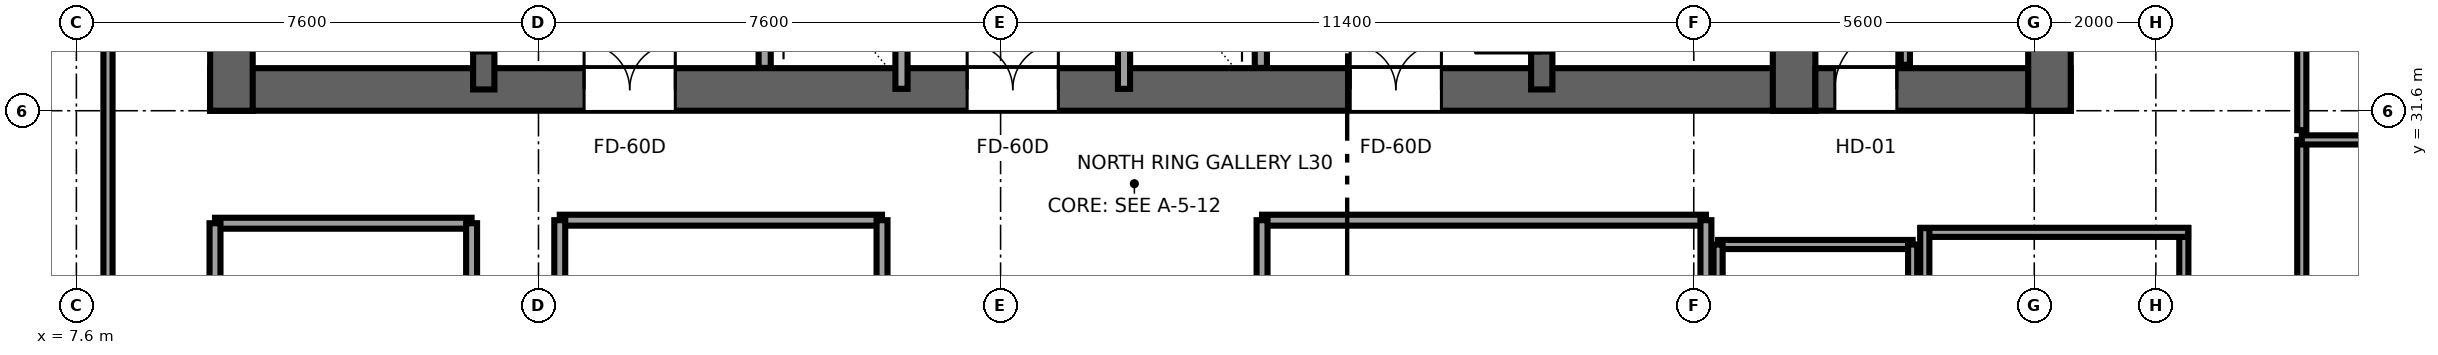
"""IFC4 building model, lengths in metres.
Left out: names, types, materials, properties, quantities, classifications, styles, units other than length and angle.
Written with IfcOpenShell. Run it as: python <this file> out.ifc"""

import sys

from ifc_helpers import new_model, si_unit, direction, frame, frame_2d, origin, place, context, subcontext, project, spatial, rectangle, extrude, source, transform, mapped, element, fill, save


model = new_model("IFC4")
c1 = context("Model", 3, precision=1e-05, world=origin(), true_north=direction((0.0, 1.0)))
c2 = subcontext(c1, "Body", "Model", "MODEL_VIEW")
j1 = project(units=[si_unit("LENGTHUNIT", "METRE"), si_unit("PLANEANGLEUNIT", "RADIAN")], contexts=[c1])
p1 = place(None, origin())
s1 = spatial("IfcSite", under=j1, at=p1, CompositionType="ELEMENT")
p2 = place(p1, origin())
s2 = spatial("IfcBuilding", under=s1, at=p2, CompositionType="ELEMENT")
p3 = place(p2, frame((0.0, 0.0, 118.65)))
s3 = spatial("IfcBuildingStorey", under=s2, at=p3, CompositionType="ELEMENT", Elevation=118.65)
p4 = place(p3, frame((9.8, 31.95, 0.0), z_axis=(0.0, 0.0, 1.0), x_axis=(1.0, 0.0, 0.0)))
e1 = element("IfcWall", 1, at=p4, inside=s3, PredefinedType="SHEAR", context=c2, shape_type="SweptSolid", body=[
    extrude(rectangle(XDim=26.4, YDim=0.7, at=frame_2d((13.2, 0.0))), origin(), (0.0, 0.0, 1.0), 3.55),
])
p5 = place(p4, frame((7.65, 0.0, 0.0), z_axis=(0.0, 0.0, 1.0), x_axis=(-1.0, 0.0, 0.0)))
e2 = element("IfcOpeningElement", 2, at=p5, cuts=e1, PredefinedType="OPENING", context=c2, shape_type="SweptSolid", body=[
    extrude(rectangle(XDim=1.5, YDim=2.04, at=frame_2d((0.75, 1.02))), frame((0.0, 0.36, 0.0), z_axis=(0.0, -1.0, 0.0), x_axis=(1.0, 0.0, 0.0)), (0.0, 0.0, 1.0), 0.72),
])
p6 = place(p4, frame((13.95, 0.0, 0.0), z_axis=(0.0, 0.0, 1.0), x_axis=(-1.0, 0.0, 0.0)))
e3 = element("IfcOpeningElement", 3, at=p6, cuts=e1, PredefinedType="OPENING", context=c2, shape_type="SweptSolid", body=[
    extrude(rectangle(XDim=1.5, YDim=2.04, at=frame_2d((0.75, 1.02))), frame((0.0, 0.36, 0.0), z_axis=(0.0, -1.0, 0.0), x_axis=(1.0, 0.0, 0.0)), (0.0, 0.0, 1.0), 0.72),
])
p7 = place(p4, frame((20.25, 0.0, 0.0), z_axis=(0.0, 0.0, 1.0), x_axis=(-1.0, 0.0, 0.0)))
e4 = element("IfcOpeningElement", 4, at=p7, cuts=e1, PredefinedType="OPENING", context=c2, shape_type="SweptSolid", body=[
    extrude(rectangle(XDim=1.5, YDim=2.04, at=frame_2d((0.75, 1.02))), frame((0.0, 0.36, 0.0), z_axis=(0.0, -1.0, 0.0), x_axis=(1.0, 0.0, 0.0)), (0.0, 0.0, 1.0), 0.72),
])
for number, where, z_axis, x_axis in (
    (5, (10.15, 31.6, 0.0), (0.0, 0.0, 1.0), (0.0, 1.0, 0.0)),
    (6, (35.85, 31.6, 0.0), (0.0, 0.0, 1.0), (0.0, 1.0, 0.0)),
):
    element("IfcWall", number, at=place(p3, frame(where, z_axis=z_axis, x_axis=x_axis)), inside=s3, PredefinedType="SHEAR", context=c2, shape_type="SweptSolid", body=[
        extrude(rectangle(XDim=13.6, YDim=0.7, at=frame_2d((6.8, 0.0))), origin(), (0.0, 0.0, 1.0), 3.55),
    ])
p8 = place(p3, frame((14.3, 31.95, 0.0), z_axis=(0.0, 0.0, 1.0), x_axis=(0.0, 1.0, 0.0)))
e7 = element("IfcWall", 7, at=p8, inside=s3, PredefinedType="SHEAR", context=c2, shape_type="SweptSolid", body=[
    extrude(rectangle(XDim=12.9, YDim=0.35, at=frame_2d((6.45, 0.0))), origin(), (0.0, 0.0, 1.0), 3.55),
])
p9 = place(p8, frame((0.6, 0.0, 0.0)))
e8 = element("IfcOpeningElement", 8, at=p9, cuts=e7, PredefinedType="OPENING", context=c2, shape_type="SweptSolid", body=[
    extrude(rectangle(XDim=1.1, YDim=2.12, at=frame_2d((0.55, 1.06))), frame((0.0, 0.185, 0.0), z_axis=(0.0, -1.0, 0.0), x_axis=(1.0, 0.0, 0.0)), (0.0, 0.0, 1.0), 0.37),
])
p10 = place(p3, frame((31.7, 31.95, 0.0), z_axis=(0.0, 0.0, 1.0), x_axis=(0.0, 1.0, 0.0)))
e9 = element("IfcWall", 9, at=p10, inside=s3, PredefinedType="SHEAR", context=c2, shape_type="SweptSolid", body=[
    extrude(rectangle(XDim=12.9, YDim=0.35, at=frame_2d((6.45, 0.0))), origin(), (0.0, 0.0, 1.0), 3.55),
])
p11 = place(p10, frame((1.7, 0.0, 0.0), z_axis=(0.0, 0.0, 1.0), x_axis=(-1.0, 0.0, 0.0)))
e10 = element("IfcOpeningElement", 10, at=p11, cuts=e9, PredefinedType="OPENING", context=c2, shape_type="SweptSolid", body=[
    extrude(rectangle(XDim=1.1, YDim=2.12, at=frame_2d((0.55, 1.06))), frame((0.0, 0.185, 0.0), z_axis=(0.0, -1.0, 0.0), x_axis=(1.0, 0.0, 0.0)), (0.0, 0.0, 1.0), 0.37),
])
p12 = place(p3, frame((36.2, 31.95, 0.0), z_axis=(0.0, 0.0, 1.0), x_axis=(1.0, 0.0, 0.0)))
e11 = element("IfcWall", 11, at=p12, inside=s3, PredefinedType="SHEAR", context=c2, shape_type="SweptSolid", body=[
    extrude(rectangle(XDim=4.2, YDim=0.7, at=frame_2d((2.1, 0.0))), origin(), (0.0, 0.0, 1.0), 3.55),
])
p13 = place(p12, frame((1.34, 0.0, 0.0), z_axis=(0.0, 0.0, 1.0), x_axis=(-1.0, 0.0, 0.0)))
e12 = element("IfcOpeningElement", 12, at=p13, cuts=e11, PredefinedType="OPENING", context=c2, shape_type="SweptSolid", body=[
    extrude(rectangle(XDim=1.02, YDim=2.03, at=frame_2d((0.51, 1.015))), frame((0.0, 0.36, 0.0), z_axis=(0.0, -1.0, 0.0), x_axis=(1.0, 0.0, 0.0)), (0.0, 0.0, 1.0), 0.72),
])
p14 = place(p3, frame((40.05, 31.6, 0.0), z_axis=(0.0, 0.0, 1.0), x_axis=(0.0, 1.0, 0.0)))
e13 = element("IfcWall", 13, at=p14, inside=s3, PredefinedType="SHEAR", context=c2, shape_type="SweptSolid", body=[
    extrude(rectangle(XDim=13.6, YDim=0.7, at=frame_2d((6.8, 0.0))), origin(), (0.0, 0.0, 1.0), 3.55),
])
for number, where, z_axis, x_axis in (
    (14, (18.92, 32.304, 0.0), (0.0, 0.0, 1.0), (0.0, 1.0, 0.0)),
    (15, (27.08, 32.304, 0.0), (0.0, 0.0, 1.0), (0.0, 1.0, 0.0)),
):
    element("IfcWall", number, at=place(p3, frame(where, z_axis=z_axis, x_axis=x_axis)), inside=s3, PredefinedType="SOLIDWALL", context=c2, shape_type="SweptSolid", body=[
        extrude(rectangle(XDim=3.846, YDim=0.2, at=frame_2d((1.923, 0.0))), origin(), (0.0, 0.0, 1.0), 3.37),
    ])
p15 = place(p3, frame((21.17, 31.96, 0.0), z_axis=(0.0, 0.0, 1.0), x_axis=(0.0, 1.0, 0.0)))
e16 = element("IfcWall", 16, at=p15, inside=s3, PredefinedType="SOLIDWALL", context=c2, shape_type="SweptSolid", body=[
    extrude(rectangle(XDim=12.58, YDim=0.2, at=frame_2d((6.29, 0.0))), origin(), (0.0, 0.0, 1.0), 3.37),
])
p16 = place(p15, frame((5.74, 0.0, 0.0)))
e17 = element("IfcOpeningElement", 17, at=p16, cuts=e16, PredefinedType="OPENING", context=c2, shape_type="SweptSolid", body=[
    extrude(rectangle(XDim=1.1, YDim=2.12, at=frame_2d((0.55, 1.06))), frame((0.0, 0.11, 0.0), z_axis=(0.0, -1.0, 0.0), x_axis=(1.0, 0.0, 0.0)), (0.0, 0.0, 1.0), 0.22),
])
p17 = place(p15, frame((8.24, 0.0, 0.0)))
e18 = element("IfcOpeningElement", 18, at=p17, cuts=e16, PredefinedType="OPENING", context=c2, shape_type="SweptSolid", body=[
    extrude(rectangle(XDim=1.1, YDim=2.12, at=frame_2d((0.55, 1.06))), frame((0.0, 0.11, 0.0), z_axis=(0.0, -1.0, 0.0), x_axis=(1.0, 0.0, 0.0)), (0.0, 0.0, 1.0), 0.22),
])
p18 = place(p3, frame((24.83, 31.96, 0.0), z_axis=(0.0, 0.0, 1.0), x_axis=(0.0, 1.0, 0.0)))
e19 = element("IfcWall", 19, at=p18, inside=s3, PredefinedType="SOLIDWALL", context=c2, shape_type="SweptSolid", body=[
    extrude(rectangle(XDim=12.58, YDim=0.2, at=frame_2d((6.29, 0.0))), origin(), (0.0, 0.0, 1.0), 3.37),
])
p19 = place(p18, frame((5.74, 0.0, 0.0)))
e20 = element("IfcOpeningElement", 20, at=p19, cuts=e19, PredefinedType="OPENING", context=c2, shape_type="SweptSolid", body=[
    extrude(rectangle(XDim=1.1, YDim=2.12, at=frame_2d((0.55, 1.06))), frame((0.0, 0.11, 0.0), z_axis=(0.0, -1.0, 0.0), x_axis=(1.0, 0.0, 0.0)), (0.0, 0.0, 1.0), 0.22),
])
p20 = place(p18, frame((8.24, 0.0, 0.0)))
e21 = element("IfcOpeningElement", 21, at=p20, cuts=e19, PredefinedType="OPENING", context=c2, shape_type="SweptSolid", body=[
    extrude(rectangle(XDim=1.1, YDim=2.12, at=frame_2d((0.55, 1.06))), frame((0.0, 0.11, 0.0), z_axis=(0.0, -1.0, 0.0), x_axis=(1.0, 0.0, 0.0)), (0.0, 0.0, 1.0), 0.22),
])
p21 = place(p3, frame((37.68, 32.355, 0.0), z_axis=(0.0, 0.0, 1.0), x_axis=(0.0, 1.0, 0.0)))
e22 = element("IfcWall", 22, at=p21, inside=s3, PredefinedType="PARTITIONING", context=c2, shape_type="SweptSolid", body=[
    extrude(rectangle(XDim=5.845, YDim=0.15, at=frame_2d((2.922, 0.0))), origin(), (0.0, 0.0, 1.0), 3.37),
])
p22 = place(p21, frame((2.413, 0.0, 0.0)))
e23 = element("IfcOpeningElement", 23, at=p22, cuts=e22, PredefinedType="OPENING", context=c2, shape_type="SweptSolid", body=[
    extrude(rectangle(XDim=1.02, YDim=2.03, at=frame_2d((0.51, 1.015))), frame((0.0, 0.085, 0.0), z_axis=(0.0, -1.0, 0.0), x_axis=(1.0, 0.0, 0.0)), (0.0, 0.0, 1.0), 0.17),
])
p23 = place(p3, frame((8.12, 21.78, 0.0), z_axis=(0.0, 0.0, 1.0), x_axis=(0.0, 1.0, 0.0)))
e24 = element("IfcWall", 24, at=p23, inside=s3, PredefinedType="PARTITIONING", context=c2, shape_type="SweptSolid", body=[
    extrude(rectangle(XDim=12.54, YDim=0.15, at=frame_2d((6.27, 0.0))), origin(), (0.0, 0.0, 1.0), 3.37),
])
p24 = place(p23, frame((5.78, 0.0, 0.0)))
e25 = element("IfcOpeningElement", 25, at=p24, cuts=e24, PredefinedType="OPENING", context=c2, shape_type="SweptSolid", body=[
    extrude(rectangle(XDim=0.98, YDim=2.12, at=frame_2d((0.49, 1.06))), frame((0.0, 0.085, 0.0), z_axis=(0.0, -1.0, 0.0), x_axis=(1.0, 0.0, 0.0)), (0.0, 0.0, 1.0), 0.17),
])
p25 = place(p3, frame((44.2, 21.78, 0.0), z_axis=(0.0, 0.0, 1.0), x_axis=(0.0, 1.0, 0.0)))
e26 = element("IfcWall", 26, at=p25, inside=s3, PredefinedType="PARTITIONING", context=c2, shape_type="SweptSolid", body=[
    extrude(rectangle(XDim=9.34, YDim=0.15, at=frame_2d((4.67, 0.0))), origin(), (0.0, 0.0, 1.0), 3.37),
])
p26 = place(p25, frame((4.18, 0.0, 0.0)))
e27 = element("IfcOpeningElement", 27, at=p26, cuts=e26, PredefinedType="OPENING", context=c2, shape_type="SweptSolid", body=[
    extrude(rectangle(XDim=0.98, YDim=2.12, at=frame_2d((0.49, 1.06))), frame((0.0, 0.085, 0.0), z_axis=(0.0, -1.0, 0.0), x_axis=(1.0, 0.0, 0.0)), (0.0, 0.0, 1.0), 0.17),
])
p27 = place(p3, frame((44.2, 31.12, 0.0), z_axis=(0.0, 0.0, 1.0), x_axis=(1.0, 0.0, 0.0)))
e28 = element("IfcWall", 28, at=p27, inside=s3, PredefinedType="PARTITIONING", context=c2, shape_type="SweptSolid", body=[
    extrude(rectangle(XDim=10.03, YDim=0.15, at=frame_2d((5.015, 0.0))), origin(), (0.0, 0.0, 1.0), 3.37),
])
p28 = place(p3, frame((44.2, 31.28, 0.0), z_axis=(0.0, 0.0, 1.0), x_axis=(0.0, 1.0, 0.0)))
e29 = element("IfcWall", 29, at=p28, inside=s3, PredefinedType="PARTITIONING", context=c2, shape_type="SweptSolid", body=[
    extrude(rectangle(XDim=6.24, YDim=0.15, at=frame_2d((3.12, 0.0))), origin(), (0.0, 0.0, 1.0), 3.37),
])
p29 = place(p28, frame((2.63, 0.0, 0.0)))
e30 = element("IfcOpeningElement", 30, at=p29, cuts=e29, PredefinedType="OPENING", context=c2, shape_type="SweptSolid", body=[
    extrude(rectangle(XDim=0.98, YDim=2.12, at=frame_2d((0.49, 1.06))), frame((0.0, 0.085, 0.0), z_axis=(0.0, -1.0, 0.0), x_axis=(1.0, 0.0, 0.0)), (0.0, 0.0, 1.0), 0.17),
])
p30 = place(p3, frame((42.26, 25.93, 0.0), z_axis=(0.0, 0.0, 1.0), x_axis=(0.0, 1.0, 0.0)))
e31 = element("IfcWall", 31, at=p30, inside=s3, PredefinedType="PARTITIONING", context=c2, shape_type="SweptSolid", body=[
    extrude(rectangle(XDim=3.74, YDim=0.15, at=frame_2d((1.87, 0.0))), origin(), (0.0, 0.0, 1.0), 3.37),
])
p31 = place(p30, frame((1.19, 0.0, 0.0)))
e32 = element("IfcOpeningElement", 32, at=p31, cuts=e31, PredefinedType="OPENING", context=c2, shape_type="SweptSolid", body=[
    extrude(rectangle(XDim=0.92, YDim=2.01, at=frame_2d((0.46, 1.005))), frame((0.0, 0.085, 0.0), z_axis=(0.0, -1.0, 0.0), x_axis=(1.0, 0.0, 0.0)), (0.0, 0.0, 1.0), 0.17),
])
p32 = place(p3, frame((37.93, 29.6, 0.0), z_axis=(0.0, 0.0, 1.0), x_axis=(1.0, 0.0, 0.0)))
e33 = element("IfcWall", 33, at=p32, inside=s3, PredefinedType="PARTITIONING", context=c2, shape_type="SweptSolid", body=[
    extrude(rectangle(XDim=4.4, YDim=0.15, at=frame_2d((2.2, 0.0))), origin(), (0.0, 0.0, 1.0), 3.37),
])
p33 = place(p3, frame((38.0, 25.93, 0.0), z_axis=(0.0, 0.0, 1.0), x_axis=(0.0, 1.0, 0.0)))
e34 = element("IfcWall", 34, at=p33, inside=s3, PredefinedType="PARTITIONING", context=c2, shape_type="SweptSolid", body=[
    extrude(rectangle(XDim=3.74, YDim=0.15, at=frame_2d((1.87, 0.0))), origin(), (0.0, 0.0, 1.0), 3.37),
])
p34 = place(p3, frame((9.88, 29.75, 0.0), z_axis=(0.0, 0.0, 1.0), x_axis=(1.0, 0.0, 0.0)))
e35 = element("IfcWall", 35, at=p34, inside=s3, PredefinedType="PARTITIONING", context=c2, shape_type="SweptSolid", body=[
    extrude(rectangle(XDim=4.22, YDim=0.18, at=frame_2d((2.11, 0.0))), origin(), (0.0, 0.0, 1.0), 3.37),
])
for number, where, z_axis, x_axis in (
    (36, (9.88, 21.7, 0.0), (0.0, 0.0, 1.0), (0.0, 1.0, 0.0)),
    (37, (14.1, 21.7, 0.0), (0.0, 0.0, 1.0), (0.0, 1.0, 0.0)),
):
    element("IfcWall", number, at=place(p3, frame(where, z_axis=z_axis, x_axis=x_axis)), inside=s3, PredefinedType="PARTITIONING", context=c2, shape_type="SweptSolid", body=[
        extrude(rectangle(XDim=8.05, YDim=0.18, at=frame_2d((4.025, 0.0))), origin(), (0.0, 0.0, 1.0), 3.37),
    ])
p35 = place(p3, frame((27.1, 29.8, 0.0), z_axis=(0.0, 0.0, 1.0), x_axis=(1.0, 0.0, 0.0)))
e38 = element("IfcWall", 38, at=p35, inside=s3, PredefinedType="PARTITIONING", context=c2, shape_type="SweptSolid", body=[
    extrude(rectangle(XDim=7.3, YDim=0.18, at=frame_2d((3.65, 0.0))), origin(), (0.0, 0.0, 1.0), 3.37),
])
for number, where, z_axis, x_axis in (
    (39, (27.1, 21.7, 0.0), (0.0, 0.0, 1.0), (0.0, 1.0, 0.0)),
    (40, (34.4, 21.7, 0.0), (0.0, 0.0, 1.0), (0.0, 1.0, 0.0)),
):
    element("IfcWall", number, at=place(p3, frame(where, z_axis=z_axis, x_axis=x_axis)), inside=s3, PredefinedType="PARTITIONING", context=c2, shape_type="SweptSolid", body=[
        extrude(rectangle(XDim=8.1, YDim=0.18, at=frame_2d((4.05, 0.0))), origin(), (0.0, 0.0, 1.0), 3.37),
    ])
p36 = place(p3, frame((15.55, 29.8, 0.0), z_axis=(0.0, 0.0, 1.0), x_axis=(1.0, 0.0, 0.0)))
e41 = element("IfcWall", 41, at=p36, inside=s3, PredefinedType="PARTITIONING", context=c2, shape_type="SweptSolid", body=[
    extrude(rectangle(XDim=5.3, YDim=0.18, at=frame_2d((2.65, 0.0))), origin(), (0.0, 0.0, 1.0), 3.37),
])
for number, where, z_axis, x_axis in (
    (42, (15.55, 21.7, 0.0), (0.0, 0.0, 1.0), (0.0, 1.0, 0.0)),
    (43, (20.85, 21.7, 0.0), (0.0, 0.0, 1.0), (0.0, 1.0, 0.0)),
):
    element("IfcWall", number, at=place(p3, frame(where, z_axis=z_axis, x_axis=x_axis)), inside=s3, PredefinedType="PARTITIONING", context=c2, shape_type="SweptSolid", body=[
        extrude(rectangle(XDim=8.1, YDim=0.18, at=frame_2d((4.05, 0.0))), origin(), (0.0, 0.0, 1.0), 3.37),
    ])
p37 = place(p3, frame((34.6, 29.4, 0.0), z_axis=(0.0, 0.0, 1.0), x_axis=(1.0, 0.0, 0.0)))
e44 = element("IfcWall", 44, at=p37, inside=s3, PredefinedType="PARTITIONING", context=c2, shape_type="SweptSolid", body=[
    extrude(rectangle(XDim=3.2, YDim=0.15, at=frame_2d((1.6, 0.0))), origin(), (0.0, 0.0, 1.0), 3.37),
])
for number, where, z_axis, x_axis in (
    (45, (34.6, 21.7, 0.0), (0.0, 0.0, 1.0), (0.0, 1.0, 0.0)),
    (46, (37.8, 21.7, 0.0), (0.0, 0.0, 1.0), (0.0, 1.0, 0.0)),
):
    element("IfcWall", number, at=place(p3, frame(where, z_axis=z_axis, x_axis=x_axis)), inside=s3, PredefinedType="PARTITIONING", context=c2, shape_type="SweptSolid", body=[
        extrude(rectangle(XDim=7.7, YDim=0.15, at=frame_2d((3.85, 0.0))), origin(), (0.0, 0.0, 1.0), 3.37),
    ])
m1 = source(origin(), c2, "Body", "SweptSolid", [
    extrude(rectangle(XDim=1.1, YDim=2.12, at=frame_2d((0.55, 1.06))), frame((0.0, 0.025, 0.0), z_axis=(0.0, -1.0, 0.0), x_axis=(1.0, 0.0, 0.0)), (0.0, 0.0, 1.0), 0.05),
])
p38 = place(p9, origin())
e47 = element("IfcDoor", 47, at=p38, inside=s3, OperationType="SINGLE_SWING_RIGHT", PredefinedType="DOOR", context=c2, shape_type="MappedRepresentation", body=[
    mapped(m1, transform((0.0, 0.0, 0.0), x_axis=(1.0, 0.0, 0.0), y_axis=(0.0, 1.0, 0.0), z_axis=(0.0, 0.0, 1.0), scale=1.0)),
])
fill(e8, e47)
p39 = place(p11, origin())
e48 = element("IfcDoor", 48, at=p39, inside=s3, OperationType="SINGLE_SWING_LEFT", PredefinedType="DOOR", context=c2, shape_type="MappedRepresentation", body=[
    mapped(m1, transform((0.0, 0.0, 0.0), x_axis=(1.0, 0.0, 0.0), y_axis=(0.0, 1.0, 0.0), z_axis=(0.0, 0.0, 1.0), scale=1.0)),
])
fill(e10, e48)
m2 = source(origin(), c2, "Body", "SweptSolid", [
    extrude(rectangle(XDim=1.5, YDim=2.04, at=frame_2d((0.75, 1.02))), frame((0.0, 0.025, 0.0), z_axis=(0.0, -1.0, 0.0), x_axis=(1.0, 0.0, 0.0)), (0.0, 0.0, 1.0), 0.05),
])
p40 = place(p5, origin())
e49 = element("IfcDoor", 49, at=p40, inside=s3, OperationType="DOUBLE_DOOR_SINGLE_SWING", PredefinedType="DOOR", context=c2, shape_type="MappedRepresentation", body=[
    mapped(m2, transform((0.0, 0.0, 0.0), x_axis=(1.0, 0.0, 0.0), y_axis=(0.0, 1.0, 0.0), z_axis=(0.0, 0.0, 1.0), scale=1.0)),
])
fill(e2, e49)
p41 = place(p6, origin())
e50 = element("IfcDoor", 50, at=p41, inside=s3, OperationType="DOUBLE_DOOR_SINGLE_SWING", PredefinedType="DOOR", context=c2, shape_type="MappedRepresentation", body=[
    mapped(m2, transform((0.0, 0.0, 0.0), x_axis=(1.0, 0.0, 0.0), y_axis=(0.0, 1.0, 0.0), z_axis=(0.0, 0.0, 1.0), scale=1.0)),
])
fill(e3, e50)
p42 = place(p7, origin())
e51 = element("IfcDoor", 51, at=p42, inside=s3, OperationType="DOUBLE_DOOR_SINGLE_SWING", PredefinedType="DOOR", context=c2, shape_type="MappedRepresentation", body=[
    mapped(m2, transform((0.0, 0.0, 0.0), x_axis=(1.0, 0.0, 0.0), y_axis=(0.0, 1.0, 0.0), z_axis=(0.0, 0.0, 1.0), scale=1.0)),
])
fill(e4, e51)
m3 = source(origin(), c2, "Body", "SweptSolid", [
    extrude(rectangle(XDim=1.02, YDim=2.03, at=frame_2d((0.51, 1.015))), frame((0.0, 0.025, 0.0), z_axis=(0.0, -1.0, 0.0), x_axis=(1.0, 0.0, 0.0)), (0.0, 0.0, 1.0), 0.05),
])
p43 = place(p13, origin())
e52 = element("IfcDoor", 52, at=p43, inside=s3, OperationType="SINGLE_SWING_RIGHT", PredefinedType="DOOR", context=c2, shape_type="MappedRepresentation", body=[
    mapped(m3, transform((0.0, 0.0, 0.0), x_axis=(1.0, 0.0, 0.0), y_axis=(0.0, 1.0, 0.0), z_axis=(0.0, 0.0, 1.0), scale=1.0)),
])
fill(e12, e52)
save(model, sys.argv[1])
